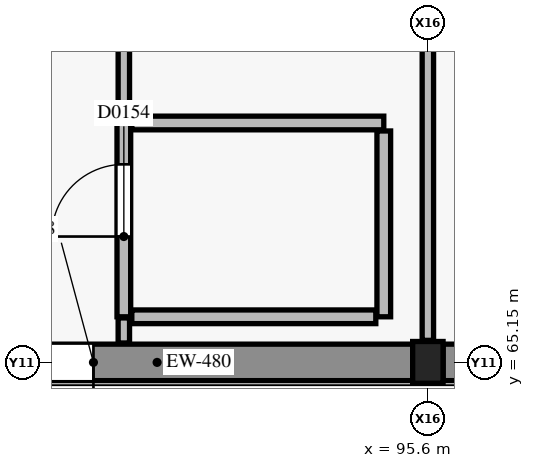
"""IFC4 building model, lengths in metres.
Left out: names, types, materials, properties, quantities, classifications, styles, units other than length and angle.
Written with IfcOpenShell. Run it as: python <this file> out.ifc"""

import sys

from ifc_helpers import new_model, si_unit, direction, frame, frame_2d, origin, origin_2d, place, context, subcontext, project, spatial, rectangle, extrude, element, fill, save


model = new_model("IFC4")
c1 = context("Model", 3, precision=1e-05, world=origin(), true_north=direction((0.0, 1.0)))
c2 = subcontext(c1, "Body", "Model", "MODEL_VIEW")
j1 = project(units=[si_unit("LENGTHUNIT", "METRE"), si_unit("PLANEANGLEUNIT", "RADIAN")], contexts=[c1])
p1 = place(None, origin())
s1 = spatial("IfcSite", under=j1, at=p1, CompositionType="ELEMENT")
p2 = place(p1, origin())
s2 = spatial("IfcBuilding", under=s1, at=p2, CompositionType="ELEMENT")
p3 = place(p2, origin())
s3 = spatial("IfcBuildingStorey", under=s2, at=p3, CompositionType="ELEMENT", Elevation=0.0)
p4 = place(p3, frame((95.6, 65.15, 0.0), z_axis=(0.0, 0.0, 1.0), x_axis=(1.0, 0.0, 0.0)))
e1 = element("IfcColumn", 1, at=p4, inside=s3, PredefinedType="COLUMN", context=c2, shape_type="SweptSolid", body=[
    extrude(rectangle(XDim=0.4, YDim=0.55, at=origin_2d()), origin(), (0.0, 0.0, 1.0), 4.8),
])
p5 = place(p3, frame((102.5, 65.15, 0.0), z_axis=(0.0, 0.0, 1.0), x_axis=(-1.0, 0.0, 0.0)))
e2 = element("IfcWall", 2, at=p5, inside=s3, PredefinedType="SOLIDWALL", context=c2, shape_type="SweptSolid", body=[
    extrude(rectangle(XDim=6.7, YDim=0.48, at=frame_2d((3.35, 0.0))), origin(), (0.0, 0.0, 1.0), 3.73),
])
p6 = place(p5, frame((1.115, 0.0, 0.6)))
e3 = element("IfcOpeningElement", 3, at=p6, cuts=e2, PredefinedType="OPENING", context=c2, shape_type="SweptSolid", body=[
    extrude(rectangle(XDim=0.8, YDim=2.6, at=frame_2d((0.4, 1.3))), frame((0.0, 0.25, 0.0), z_axis=(0.0, -1.0, 0.0), x_axis=(1.0, 0.0, 0.0)), (0.0, 0.0, 1.0), 0.5),
])
p7 = place(p5, frame((4.585, 0.0, 0.9)))
e4 = element("IfcOpeningElement", 4, at=p7, cuts=e2, PredefinedType="OPENING", context=c2, shape_type="SweptSolid", body=[
    extrude(rectangle(XDim=0.6, YDim=1.8, at=frame_2d((0.3, 0.9))), frame((0.0, 0.25, 0.0), z_axis=(0.0, -1.0, 0.0), x_axis=(1.0, 0.0, 0.0)), (0.0, 0.0, 1.0), 0.5),
])
p8 = place(p3, frame((95.4, 65.15, 0.0), z_axis=(0.0, 0.0, 1.0), x_axis=(-1.0, 0.0, 0.0)))
e5 = element("IfcWall", 5, at=p8, inside=s3, PredefinedType="SOLIDWALL", context=c2, shape_type="SweptSolid", body=[
    extrude(rectangle(XDim=6.725, YDim=0.48, at=frame_2d((3.362, 0.0))), origin(), (0.0, 0.0, 1.0), 3.73),
])
p9 = place(p8, frame((4.2, 0.0, 0.0)))
e6 = element("IfcOpeningElement", 6, at=p9, cuts=e5, PredefinedType="OPENING", context=c2, shape_type="SweptSolid", body=[
    extrude(rectangle(XDim=1.6, YDim=2.3, at=frame_2d((0.8, 1.15))), frame((0.0, 0.25, 0.0), z_axis=(0.0, -1.0, 0.0), x_axis=(1.0, 0.0, 0.0)), (0.0, 0.0, 1.0), 0.5),
])
p10 = place(p3, frame((91.6, 65.75, 0.0), z_axis=(0.0, 0.0, 1.0), x_axis=(0.0, 1.0, 0.0)))
e7 = element("IfcWall", 7, at=p10, inside=s3, PredefinedType="PLUMBINGWALL", context=c2, shape_type="SweptSolid", body=[
    extrude(rectangle(XDim=2.55, YDim=0.18, at=frame_2d((1.275, 0.0))), origin(), (0.0, 0.0, 1.0), 4.115),
])
p11 = place(p10, frame((1.056, 0.0, 0.0)))
e8 = element("IfcOpeningElement", 8, at=p11, cuts=e7, PredefinedType="OPENING", context=c2, shape_type="SweptSolid", body=[
    extrude(rectangle(XDim=0.95, YDim=2.1, at=frame_2d((0.475, 1.05))), frame((0.0, 0.1, 0.0), z_axis=(0.0, -1.0, 0.0), x_axis=(1.0, 0.0, 0.0)), (0.0, 0.0, 1.0), 0.2),
])
p12 = place(p3, frame((91.705, 68.3, 0.0), z_axis=(0.0, 0.0, 1.0), x_axis=(1.0, 0.0, 0.0)))
e9 = element("IfcWall", 9, at=p12, inside=s3, PredefinedType="PLUMBINGWALL", context=c2, shape_type="SweptSolid", body=[
    extrude(rectangle(XDim=3.315, YDim=0.18, at=frame_2d((1.657, 0.0))), origin(), (0.0, 0.0, 1.0), 4.55),
])
p13 = place(p3, frame((95.02, 65.75, 0.0), z_axis=(0.0, 0.0, 1.0), x_axis=(0.0, 1.0, 0.0)))
e10 = element("IfcWall", 10, at=p13, inside=s3, PredefinedType="PLUMBINGWALL", context=c2, shape_type="SweptSolid", body=[
    extrude(rectangle(XDim=2.445, YDim=0.18, at=frame_2d((1.223, 0.0))), origin(), (0.0, 0.0, 1.0), 4.115),
])
p14 = place(p3, frame((91.705, 65.75, 0.0), z_axis=(0.0, 0.0, 1.0), x_axis=(1.0, 0.0, 0.0)))
e11 = element("IfcWall", 11, at=p14, inside=s3, PredefinedType="PLUMBINGWALL", context=c2, shape_type="SweptSolid", body=[
    extrude(rectangle(XDim=3.21, YDim=0.18, at=frame_2d((1.605, 0.0))), origin(), (0.0, 0.0, 1.0), 4.55),
])
p15 = place(p3, frame((91.6, 65.405, 0.0), z_axis=(0.0, 0.0, 1.0), x_axis=(0.0, 1.0, 0.0)))
e12 = element("IfcWall", 12, at=p15, inside=s3, PredefinedType="PARTITIONING", context=c2, shape_type="SweptSolid", body=[
    extrude(rectangle(XDim=0.33, YDim=0.15, at=frame_2d((0.165, 0.0))), origin(), (0.0, 0.0, 1.0), 4.55),
])
p16 = place(p3, frame((91.6, 68.315, 0.0), z_axis=(0.0, 0.0, 1.0), x_axis=(0.0, 1.0, 0.0)))
e13 = element("IfcWall", 13, at=p16, inside=s3, PredefinedType="PARTITIONING", context=c2, shape_type="SweptSolid", body=[
    extrude(rectangle(XDim=8.135, YDim=0.15, at=frame_2d((4.067, 0.0))), origin(), (0.0, 0.0, 1.0), 2.415),
])
p17 = place(p16, frame((3.567, 0.0, 0.0)))
e14 = element("IfcOpeningElement", 14, at=p17, cuts=e13, PredefinedType="OPENING", context=c2, shape_type="SweptSolid", body=[
    extrude(rectangle(XDim=1.0, YDim=2.15, at=frame_2d((0.5, 1.075))), frame((0.0, 0.085, 0.0), z_axis=(0.0, -1.0, 0.0), x_axis=(1.0, 0.0, 0.0)), (0.0, 0.0, 1.0), 0.17),
])
p18 = place(p3, frame((95.6, 65.44, 0.0), z_axis=(0.0, 0.0, 1.0), x_axis=(0.0, 1.0, 0.0)))
e15 = element("IfcWall", 15, at=p18, inside=s3, PredefinedType="PARTITIONING", context=c2, shape_type="SweptSolid", body=[
    extrude(rectangle(XDim=6.52, YDim=0.15, at=frame_2d((3.26, 0.0))), origin(), (0.0, 0.0, 1.0), 3.885),
])
p19 = place(p9, origin())
e16 = element("IfcDoor", 16, at=p19, inside=s3, OperationType="DOUBLE_DOOR_SINGLE_SWING", PredefinedType="DOOR", context=c2, shape_type="SweptSolid", body=[
    extrude(rectangle(XDim=1.6, YDim=2.3, at=frame_2d((0.8, 1.15))), frame((0.0, 0.025, 0.0), z_axis=(0.0, -1.0, 0.0), x_axis=(1.0, 0.0, 0.0)), (0.0, 0.0, 1.0), 0.05),
])
fill(e6, e16)
p20 = place(p11, origin())
e17 = element("IfcDoor", 17, at=p20, inside=s3, OperationType="SINGLE_SWING_LEFT", PredefinedType="DOOR", context=c2, shape_type="SweptSolid", body=[
    extrude(rectangle(XDim=0.95, YDim=2.1, at=frame_2d((0.475, 1.05))), frame((0.0, 0.025, 0.0), z_axis=(0.0, -1.0, 0.0), x_axis=(1.0, 0.0, 0.0)), (0.0, 0.0, 1.0), 0.05),
])
fill(e8, e17)
save(model, sys.argv[1])
